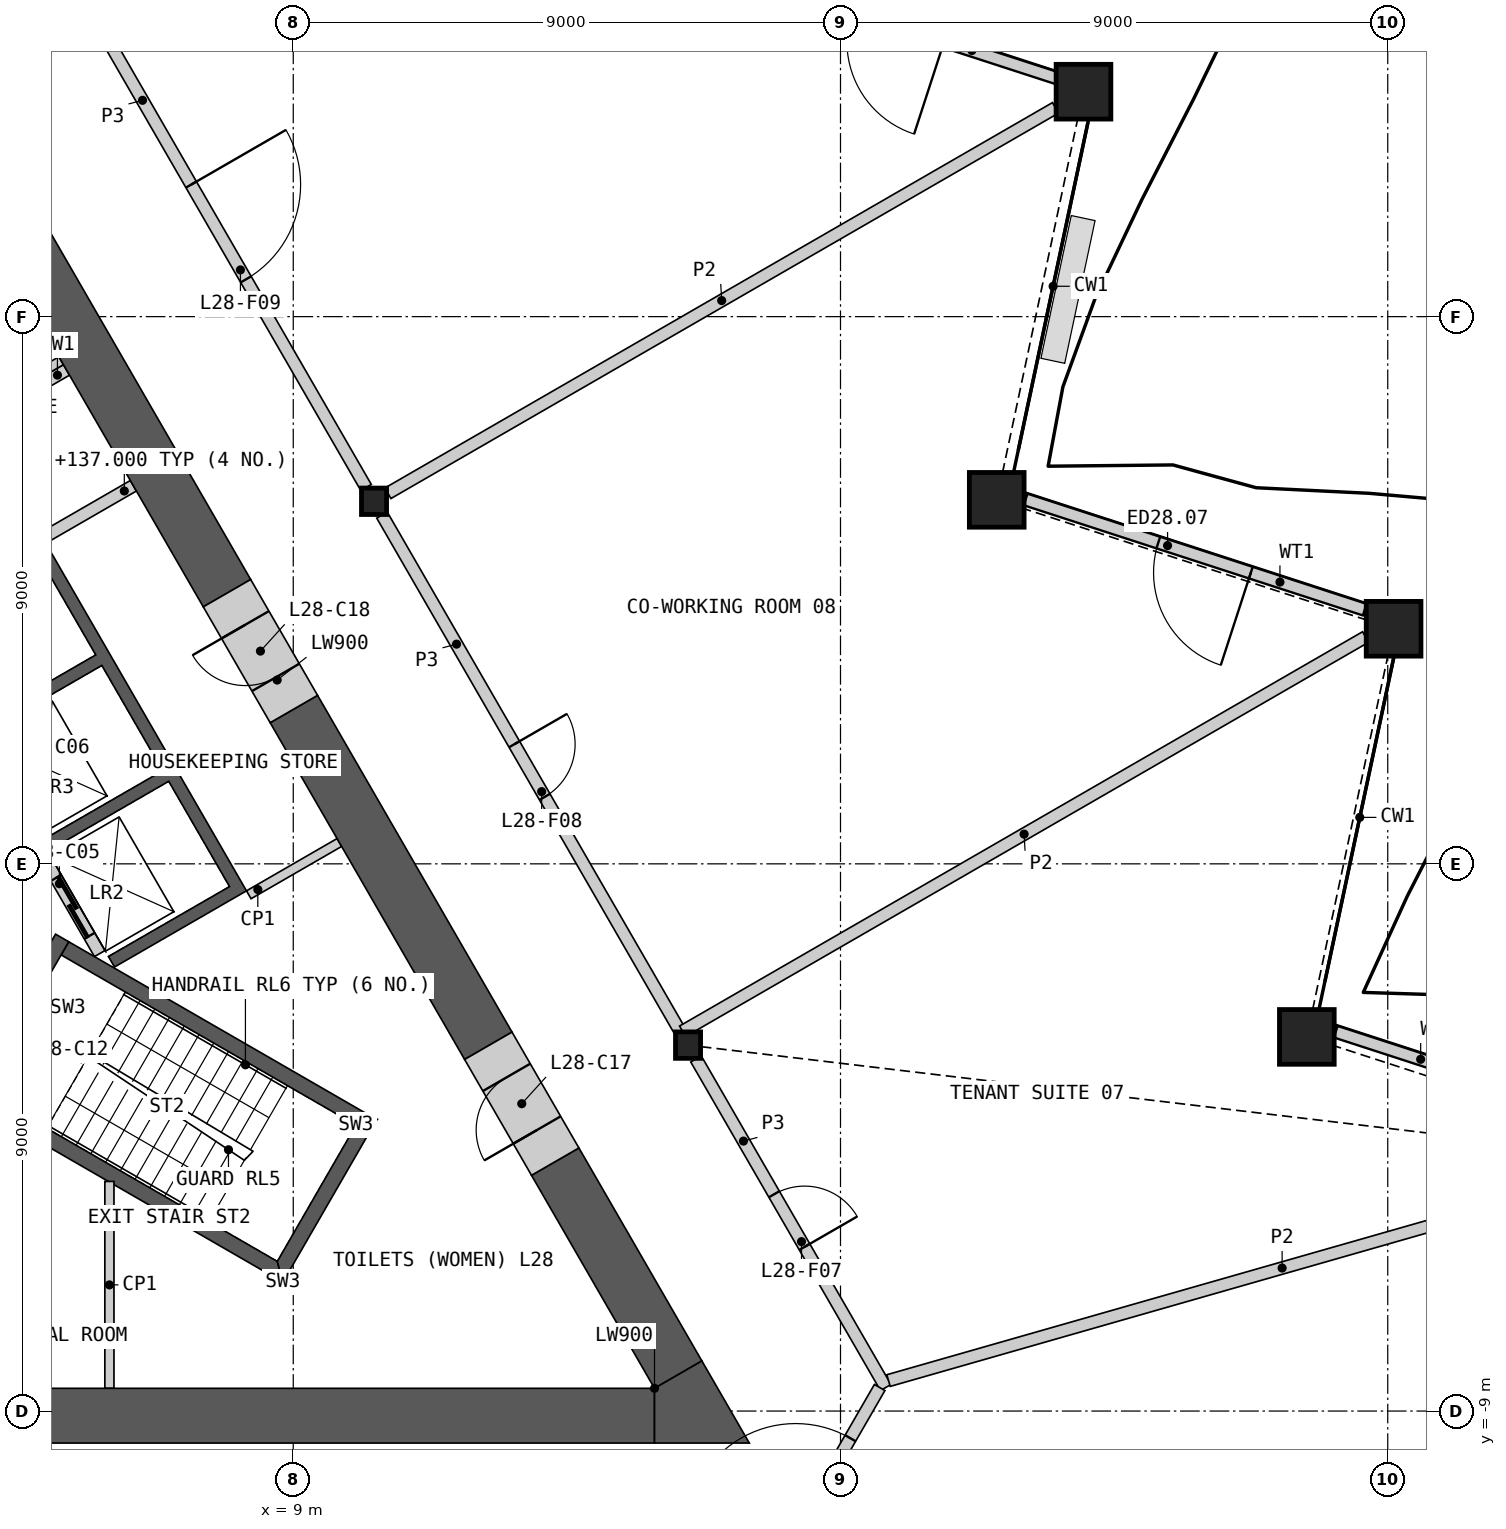
"""IFC4 building model, lengths in metres.
Left out: names, types, materials, properties, quantities, classifications, styles, units other than length and angle.
Written with IfcOpenShell. Run it as: python <this file> out.ifc"""

import sys

from ifc_helpers import new_model, si_unit, direction, frame, frame_2d, origin, origin_2d, place, context, subcontext, project, spatial, polyline, rectangle, hollow_rectangle, i_section, outline, extrude, element, fill, save


model = new_model("IFC4")
c1 = context("Model", 3, precision=1e-05, world=origin(), true_north=direction((0.0, 1.0)))
c2 = subcontext(c1, "Body", "Model", "MODEL_VIEW")
j1 = project(units=[si_unit("LENGTHUNIT", "METRE"), si_unit("PLANEANGLEUNIT", "RADIAN")], contexts=[c1])
p1 = place(None, origin())
s1 = spatial("IfcSite", under=j1, at=p1, CompositionType="ELEMENT")
p2 = place(p1, origin())
s2 = spatial("IfcBuilding", under=s1, at=p2, CompositionType="ELEMENT")
p3 = place(p2, frame((0.0, 0.0, 133.2)))
s3 = spatial("IfcBuildingStorey", under=s2, at=p3, CompositionType="ELEMENT", Elevation=133.2)
for number, where, z_axis, x_axis in (
    (1, (25.669, -2.846, 0.0), (0.0, 0.0, 1.0), (1.0, 0.0, 0.0)),
    (2, (27.096, 3.866, 0.0), (0.0, 0.0, 1.0), (1.0, 0.0, 0.0)),
    (3, (20.57, 5.987, 0.0), (0.0, 0.0, 1.0), (1.0, 0.0, 0.0)),
    (4, (21.996, 12.699, 0.0), (0.0, 0.0, 1.0), (1.0, 0.0, 0.0)),
):
    element("IfcColumn", number, at=place(p3, frame(where, z_axis=z_axis, x_axis=x_axis)), inside=s3, PredefinedType="COLUMN", context=c2, shape_type="SweptSolid", body=[
        extrude(hollow_rectangle(XDim=0.9, YDim=0.9, WallThickness=0.06, at=origin_2d()), origin(), (0.0, 0.0, 1.0), 4.2),
    ])
for number, where, z_axis, x_axis in (
    (5, (15.493, -2.982, 0.0), (0.0, 0.0, 1.0), (1.0, 0.0, 0.0)),
    (6, (10.328, 5.963, 0.0), (0.0, 0.0, 1.0), (1.0, 0.0, 0.0)),
):
    element("IfcColumn", number, at=place(p3, frame(where, z_axis=z_axis, x_axis=x_axis)), inside=s3, PredefinedType="COLUMN", context=c2, shape_type="SweptSolid", body=[
        extrude(i_section(OverallWidth=0.412, OverallDepth=0.435, WebThickness=0.036, FlangeThickness=0.057, at=origin_2d()), origin(), (0.0, 0.0, 1.0), 4.2),
    ])
p4 = place(p3, frame((31.734, -4.577, 0.0), z_axis=(0.0, 0.0, 1.0), x_axis=(-0.951060927669, 0.309003417231, 0.0)))
e7 = element("IfcWall", 7, at=p4, inside=s3, PredefinedType="SOLIDWALL", context=c2, shape_type="SweptSolid", body=[
    extrude(rectangle(XDim=5.877, YDim=0.2, at=frame_2d((2.939, 0.0))), origin(), (0.0, 0.0, 1.0), 3.189),
])
p5 = place(p4, frame((2.042, 0.0, 0.0)))
e8 = element("IfcOpeningElement", 8, at=p5, cuts=e7, PredefinedType="OPENING", context=c2, shape_type="SweptSolid", body=[
    extrude(rectangle(XDim=1.6, YDim=2.4, at=frame_2d((0.8, 1.2))), frame((0.0, 0.11, 0.0), z_axis=(0.0, -1.0, 0.0), x_axis=(1.0, 0.0, 0.0)), (0.0, 0.0, 1.0), 0.22),
])
p6 = place(p3, frame((26.622, 4.181, 0.0), z_axis=(0.0, 0.0, 1.0), x_axis=(-0.951053952554, 0.309024884649, 0.0)))
e9 = element("IfcWall", 9, at=p6, inside=s3, PredefinedType="SOLIDWALL", context=c2, shape_type="SweptSolid", body=[
    extrude(rectangle(XDim=5.865, YDim=0.2, at=frame_2d((2.932, 0.0))), origin(), (0.0, 0.0, 1.0), 3.189),
])
p7 = place(p6, frame((1.969, 0.0, 0.0)))
e10 = element("IfcOpeningElement", 10, at=p7, cuts=e9, PredefinedType="OPENING", context=c2, shape_type="SweptSolid", body=[
    extrude(rectangle(XDim=1.6, YDim=2.4, at=frame_2d((0.8, 1.2))), frame((0.0, 0.11, 0.0), z_axis=(0.0, -1.0, 0.0), x_axis=(1.0, 0.0, 0.0)), (0.0, 0.0, 1.0), 0.22),
])
p8 = place(p3, frame((21.567, 12.92, 0.0), z_axis=(0.0, 0.0, 1.0), x_axis=(-0.951051366173, 0.309032844373, 0.0)))
e11 = element("IfcWall", 11, at=p8, inside=s3, PredefinedType="SOLIDWALL", context=c2, shape_type="SweptSolid", body=[
    extrude(rectangle(XDim=5.912, YDim=0.2, at=frame_2d((2.956, 0.0))), origin(), (0.0, 0.0, 1.0), 3.189),
])
p9 = place(p8, frame((1.957, 0.0, 0.0)))
e12 = element("IfcOpeningElement", 12, at=p9, cuts=e11, PredefinedType="OPENING", context=c2, shape_type="SweptSolid", body=[
    extrude(rectangle(XDim=1.6, YDim=2.4, at=frame_2d((0.8, 1.2))), frame((0.0, 0.11, 0.0), z_axis=(0.0, -1.0, 0.0), x_axis=(1.0, 0.0, 0.0)), (0.0, 0.0, 1.0), 0.22),
])
p10 = place(p3, origin())
e13 = element("IfcWall", 13, at=p10, inside=s3, PredefinedType="SHEAR", context=c2, shape_type="SweptSolid", body=[
    extrude(outline(polyline([(2.66, 4.192), (4.831, 5.445), (8.231, -0.444), (6.061, -1.697), (5.96, -1.524), (7.952, -0.374), (6.952, 1.358), (4.96, 0.208), (4.861, 0.381), (6.852, 1.531), (5.852, 3.263), (3.861, 2.113), (3.76, 2.287), (5.752, 3.437), (4.752, 5.169), (2.76, 4.019), (2.66, 4.192)])), origin(), (0.0, 0.0, 1.0), 3.8),
])
p11 = place(p3, frame((5.817, -1.476, 0.0), z_axis=(0.0, 0.0, 1.0), x_axis=(-0.500002616675, 0.866023893041, 0.0)))
e14 = element("IfcWall", 14, at=p11, inside=s3, PredefinedType="SOLIDWALL", context=c2, shape_type="SweptSolid", body=[
    extrude(rectangle(XDim=8.373, YDim=0.2, at=frame_2d((4.187, 0.0))), origin(), (0.0, 0.0, 1.0), 3.8),
])
p12 = place(p11, frame((0.337, 0.0, 0.0)))
e15 = element("IfcOpeningElement", 15, at=p12, cuts=e14, PredefinedType="OPENING", context=c2, shape_type="SweptSolid", body=[
    extrude(rectangle(XDim=1.1, YDim=2.1, at=frame_2d((0.55, 1.05))), frame((0.0, 0.11, 0.0), z_axis=(0.0, -1.0, 0.0), x_axis=(1.0, 0.0, 0.0)), (0.0, 0.0, 1.0), 0.22),
])
p13 = place(p11, frame((2.537, 0.0, 0.0)))
e16 = element("IfcOpeningElement", 16, at=p13, cuts=e14, PredefinedType="OPENING", context=c2, shape_type="SweptSolid", body=[
    extrude(rectangle(XDim=1.1, YDim=2.1, at=frame_2d((0.55, 1.05))), frame((0.0, 0.11, 0.0), z_axis=(0.0, -1.0, 0.0), x_axis=(1.0, 0.0, 0.0)), (0.0, 0.0, 1.0), 0.22),
])
p14 = place(p11, frame((4.737, 0.0, 0.0)))
e17 = element("IfcOpeningElement", 17, at=p14, cuts=e14, PredefinedType="OPENING", context=c2, shape_type="SweptSolid", body=[
    extrude(rectangle(XDim=1.1, YDim=2.1, at=frame_2d((0.55, 1.05))), frame((0.0, 0.11, 0.0), z_axis=(0.0, -1.0, 0.0), x_axis=(1.0, 0.0, 0.0)), (0.0, 0.0, 1.0), 0.22),
])
p15 = place(p11, frame((7.037, 0.0, 0.0)))
e18 = element("IfcOpeningElement", 18, at=p15, cuts=e14, PredefinedType="OPENING", context=c2, shape_type="SweptSolid", body=[
    extrude(rectangle(XDim=0.9, YDim=2.1, at=frame_2d((0.45, 1.05))), frame((0.0, 0.11, 0.0), z_axis=(0.0, -1.0, 0.0), x_axis=(1.0, 0.0, 0.0)), (0.0, 0.0, 1.0), 0.22),
])
for number, where, z_axis, x_axis in (
    (19, (4.881, 5.358, 0.0), (0.0, 0.0, 1.0), (0.866, 0.5, 0.0)),
    (20, (3.781, 7.263, 0.0), (0.0, 0.0, 1.0), (0.866, 0.5, 0.0)),
):
    element("IfcWall", number, at=place(p3, frame(where, z_axis=z_axis, x_axis=x_axis)), inside=s3, PredefinedType="SHEAR", context=c2, shape_type="SweptSolid", body=[
        extrude(rectangle(XDim=1.72, YDim=0.2, at=frame_2d((0.86, 0.0))), origin(), (0.0, 0.0, 1.0), 3.8),
    ])
p16 = place(p3, origin())
e21 = element("IfcWall", 21, at=p16, inside=s3, PredefinedType="SHEAR", context=c2, shape_type="SweptSolid", body=[
    extrude(outline(polyline([(3.763, -3.956), (8.83, -6.881), (8.738, -6.539), (3.888, -3.739), (3.763, -3.956)])), origin(), (0.0, 0.0, 1.0), 3.8),
])
p17 = place(p3, origin())
e22 = element("IfcWall", 22, at=p17, inside=s3, PredefinedType="SHEAR", context=c2, shape_type="SweptSolid", body=[
    extrude(outline(polyline([(8.83, -6.881), (10.374, -4.206), (10.032, -4.298), (8.738, -6.539), (8.83, -6.881)])), origin(), (0.0, 0.0, 1.0), 3.8),
])
p18 = place(p3, origin())
e23 = element("IfcWall", 23, at=p18, inside=s3, PredefinedType="SHEAR", context=c2, shape_type="SweptSolid", body=[
    extrude(outline(polyline([(10.032, -4.298), (10.374, -4.206), (5.307, -1.281), (5.182, -1.498), (10.032, -4.298)])), origin(), (0.0, 0.0, 1.0), 3.8),
])
p19 = place(p3, frame((3.655, -3.893, 0.0), z_axis=(0.0, 0.0, 1.0), x_axis=(0.499982516597, 0.866035497597, 0.0)))
e24 = element("IfcWall", 24, at=p19, inside=s3, PredefinedType="SHEAR", context=c2, shape_type="SweptSolid", body=[
    extrude(rectangle(XDim=3.088, YDim=0.25, at=frame_2d((1.544, 0.0))), origin(), (0.0, 0.0, 1.0), 3.8),
])
p20 = place(p19, frame((0.994, 0.0, 0.0)))
e25 = element("IfcOpeningElement", 25, at=p20, cuts=e24, PredefinedType="OPENING", context=c2, shape_type="SweptSolid", body=[
    extrude(rectangle(XDim=1.1, YDim=2.1, at=frame_2d((0.55, 1.05))), frame((0.0, 0.135, 0.0), z_axis=(0.0, -1.0, 0.0), x_axis=(1.0, 0.0, 0.0)), (0.0, 0.0, 1.0), 0.27),
])
for number, where, z_axis, x_axis in (
    (26, (3.693, 7.415, 0.0), (0.0, 0.0, 1.0), (0.866, 0.5, 0.0)),
    (27, (8.268, -0.509, 0.0), (0.0, 0.0, 1.0), (0.866, 0.5, 0.0)),
):
    element("IfcWall", number, at=place(p3, frame(where, z_axis=z_axis, x_axis=x_axis)), inside=s3, PredefinedType="PARTITIONING", context=c2, shape_type="SweptSolid", body=[
        extrude(rectangle(XDim=1.72, YDim=0.15, at=frame_2d((0.86, 0.0))), origin(), (0.0, 0.0, 1.0), 3.8),
    ])
p21 = place(p3, frame((5.977, -8.626, 0.0), z_axis=(0.0, 0.0, 1.0), x_axis=(0.0, 1.0, 0.0)))
e28 = element("IfcWall", 28, at=p21, inside=s3, PredefinedType="PARTITIONING", context=c2, shape_type="SweptSolid", body=[
    extrude(rectangle(XDim=3.403, YDim=0.15, at=frame_2d((1.701, 0.0))), origin(), (0.0, 0.0, 1.0), 3.8),
])
p22 = place(p3, frame((3.913, -9.076, 0.0), z_axis=(0.0, 0.0, 1.0), x_axis=(1.0, 0.0, 0.0)))
e29 = element("IfcWall", 29, at=p22, inside=s3, PredefinedType="SHEAR", context=c2, shape_type="SweptSolid", body=[
    extrude(rectangle(XDim=11.029, YDim=0.9, at=frame_2d((5.514, 0.0))), origin(), (0.0, 0.0, 1.0), 3.8),
])
p23 = place(p3, frame((7.91, 4.451, 0.0), z_axis=(0.0, 0.0, 1.0), x_axis=(-0.500001962043, 0.866024270995, 0.0)))
e30 = element("IfcWall", 30, at=p23, inside=s3, PredefinedType="SHEAR", context=c2, shape_type="SweptSolid", body=[
    extrude(rectangle(XDim=8.796, YDim=0.9, at=frame_2d((4.398, 0.0))), origin(), (0.0, 0.0, 1.0), 3.8),
])
p24 = place(p3, frame((12.208, -2.992, 0.0), z_axis=(0.0, 0.0, 1.0), x_axis=(-0.499990106751, 0.866031115579, 0.0)))
e31 = element("IfcWall", 31, at=p24, inside=s3, PredefinedType="SHEAR", context=c2, shape_type="SweptSolid", body=[
    extrude(rectangle(XDim=6.396, YDim=0.9, at=frame_2d((3.198, 0.0))), origin(), (0.0, 0.0, 1.0), 3.8),
])
p25 = place(p3, frame((15.331, -8.401, 0.0), z_axis=(0.0, 0.0, 1.0), x_axis=(-0.499974938593, 0.866039872511, 0.0)))
e32 = element("IfcWall", 32, at=p25, inside=s3, PredefinedType="SHEAR", context=c2, shape_type="SweptSolid", body=[
    extrude(rectangle(XDim=4.046, YDim=0.9, at=frame_2d((2.023, 0.0))), origin(), (0.0, 0.0, 1.0), 3.8),
])
p26 = place(p3, origin())
e33 = element("IfcWall", 33, at=p26, inside=s3, PredefinedType="SHEAR", context=c2, shape_type="SweptSolid", body=[
    extrude(outline(polyline([(14.941, -8.626), (15.721, -8.176), (16.5, -9.526), (14.941, -9.526), (14.941, -8.626)])), origin(), (0.0, 0.0, 1.0), 3.8),
])
p27 = place(p3, frame((13.308, -4.898, 0.0), z_axis=(0.0, 0.0, 1.0), x_axis=(-0.50002983664, 0.866008176907, 0.0)))
e34 = element("IfcWall", 34, at=p27, inside=s3, PredefinedType="SHEAR", context=c2, shape_type="SweptSolid", body=[
    extrude(rectangle(XDim=2.2, YDim=0.9, at=frame_2d((1.1, 0.0))), origin(), (0.0, 0.0, 1.0), 3.8),
])
p28 = place(p27, frame((0.6, 0.0, 0.0)))
e35 = element("IfcOpeningElement", 35, at=p28, cuts=e34, PredefinedType="OPENING", context=c2, shape_type="SweptSolid", body=[
    extrude(rectangle(XDim=1.0, YDim=2.1, at=frame_2d((0.5, 1.05))), frame((0.0, 0.46, 0.0), z_axis=(0.0, -1.0, 0.0), x_axis=(1.0, 0.0, 0.0)), (0.0, 0.0, 1.0), 0.92),
])
p29 = place(p3, frame((9.01, 2.546, 0.0), z_axis=(0.0, 0.0, 1.0), x_axis=(-0.499994660107, 0.866028486751, 0.0)))
e36 = element("IfcWall", 36, at=p29, inside=s3, PredefinedType="SHEAR", context=c2, shape_type="SweptSolid", body=[
    extrude(rectangle(XDim=2.2, YDim=0.9, at=frame_2d((1.1, 0.0))), origin(), (0.0, 0.0, 1.0), 3.8),
])
p30 = place(p29, frame((0.6, 0.0, 0.0)))
e37 = element("IfcOpeningElement", 37, at=p30, cuts=e36, PredefinedType="OPENING", context=c2, shape_type="SweptSolid", body=[
    extrude(rectangle(XDim=1.0, YDim=2.1, at=frame_2d((0.5, 1.05))), frame((0.0, 0.46, 0.0), z_axis=(0.0, -1.0, 0.0), x_axis=(1.0, 0.0, 0.0)), (0.0, 0.0, 1.0), 0.92),
])
p31 = place(p3, frame((10.46, 5.736, 0.0), z_axis=(0.0, 0.0, 1.0), x_axis=(0.500004141693, -0.866023012564, 0.0)))
e38 = element("IfcWall", 38, at=p31, inside=s3, PredefinedType="PARTITIONING", context=c2, shape_type="SweptSolid", body=[
    extrude(rectangle(XDim=9.803, YDim=0.2, at=frame_2d((4.902, 0.0))), origin(), (0.0, 0.0, 1.0), 3.8),
])
p32 = place(p31, frame((4.352, 0.0, 0.0)))
e39 = element("IfcOpeningElement", 39, at=p32, cuts=e38, PredefinedType="OPENING", context=c2, shape_type="SweptSolid", body=[
    extrude(rectangle(XDim=1.0, YDim=2.1, at=frame_2d((0.5, 1.05))), frame((0.0, 0.11, 0.0), z_axis=(0.0, -1.0, 0.0), x_axis=(1.0, 0.0, 0.0)), (0.0, 0.0, 1.0), 0.22),
])
p33 = place(p3, frame((5.295, 14.68, 0.0), z_axis=(0.0, 0.0, 1.0), x_axis=(0.500012035596, -0.866018454918, 0.0)))
e40 = element("IfcWall", 40, at=p33, inside=s3, PredefinedType="PARTITIONING", context=c2, shape_type="SweptSolid", body=[
    extrude(rectangle(XDim=9.803, YDim=0.2, at=frame_2d((4.902, 0.0))), origin(), (0.0, 0.0, 1.0), 3.8),
])
p34 = place(p33, frame((4.052, 0.0, 0.0)))
e41 = element("IfcOpeningElement", 41, at=p34, cuts=e40, PredefinedType="OPENING", context=c2, shape_type="SweptSolid", body=[
    extrude(rectangle(XDim=1.8, YDim=2.1, at=frame_2d((0.9, 1.05))), frame((0.0, 0.11, 0.0), z_axis=(0.0, -1.0, 0.0), x_axis=(1.0, 0.0, 0.0)), (0.0, 0.0, 1.0), 0.22),
])
p35 = place(p3, frame((15.624, -3.209, 0.0), z_axis=(0.0, 0.0, 1.0), x_axis=(0.499997920671, -0.866026604282, 0.0)))
e42 = element("IfcWall", 42, at=p35, inside=s3, PredefinedType="PARTITIONING", context=c2, shape_type="SweptSolid", body=[
    extrude(rectangle(XDim=6.24, YDim=0.2, at=frame_2d((3.12, 0.0))), origin(), (0.0, 0.0, 1.0), 3.8),
])
p36 = place(p35, frame((2.57, 0.0, 0.0)))
e43 = element("IfcOpeningElement", 43, at=p36, cuts=e42, PredefinedType="OPENING", context=c2, shape_type="SweptSolid", body=[
    extrude(rectangle(XDim=1.0, YDim=2.1, at=frame_2d((0.5, 1.05))), frame((0.0, 0.11, 0.0), z_axis=(0.0, -1.0, 0.0), x_axis=(1.0, 0.0, 0.0)), (0.0, 0.0, 1.0), 0.22),
])
p37 = place(p3, frame((16.781, -11.84, 0.0), z_axis=(0.0, 0.0, 1.0), x_axis=(0.499958791762, 0.866049194065, 0.0)))
e44 = element("IfcWall", 44, at=p37, inside=s3, PredefinedType="PARTITIONING", context=c2, shape_type="SweptSolid", body=[
    extrude(rectangle(XDim=3.726, YDim=0.2, at=frame_2d((1.863, 0.0))), origin(), (0.0, 0.0, 1.0), 3.8),
])
p38 = place(p37, frame((0.963, 0.0, 0.0)))
e45 = element("IfcOpeningElement", 45, at=p38, cuts=e44, PredefinedType="OPENING", context=c2, shape_type="SweptSolid", body=[
    extrude(rectangle(XDim=1.8, YDim=2.1, at=frame_2d((0.9, 1.05))), frame((0.0, 0.11, 0.0), z_axis=(0.0, -1.0, 0.0), x_axis=(1.0, 0.0, 0.0)), (0.0, 0.0, 1.0), 0.22),
])
p39 = place(p3, frame((18.79, -8.499, 0.0), z_axis=(0.0, 0.0, 1.0), x_axis=(0.961478776026, 0.274879179372, 0.0)))
e46 = element("IfcWall", 46, at=p39, inside=s3, PredefinedType="PARTITIONING", context=c2, shape_type="SweptSolid", body=[
    extrude(rectangle(XDim=13.465, YDim=0.2, at=frame_2d((6.732, 0.0))), origin(), (0.0, 0.0, 1.0), 2.885),
])
p40 = place(p3, frame((15.403, -2.754, 0.0), z_axis=(0.0, 0.0, 1.0), x_axis=(0.866024473704, 0.500001610943, 0.0)))
e47 = element("IfcWall", 47, at=p40, inside=s3, PredefinedType="PARTITIONING", context=c2, shape_type="SweptSolid", body=[
    extrude(rectangle(XDim=12.971, YDim=0.2, at=frame_2d((6.485, 0.0))), origin(), (0.0, 0.0, 1.0), 2.885),
])
p41 = place(p3, frame((10.556, 6.094, 0.0), z_axis=(0.0, 0.0, 1.0), x_axis=(0.86602461759, 0.500001361726, 0.0)))
e48 = element("IfcWall", 48, at=p41, inside=s3, PredefinedType="PARTITIONING", context=c2, shape_type="SweptSolid", body=[
    extrude(rectangle(XDim=12.679, YDim=0.2, at=frame_2d((6.34, 0.0))), origin(), (0.0, 0.0, 1.0), 2.885),
])
p42 = place(p7, origin())
e49 = element("IfcDoor", 49, at=p42, inside=s3, OperationType="DOUBLE_DOOR_SINGLE_SWING", PredefinedType="DOOR", context=c2, shape_type="SweptSolid", body=[
    extrude(rectangle(XDim=1.6, YDim=2.4, at=frame_2d((0.8, 1.2))), frame((0.0, 0.025, 0.0), z_axis=(0.0, -1.0, 0.0), x_axis=(1.0, 0.0, 0.0)), (0.0, 0.0, 1.0), 0.05),
])
fill(e10, e49)
p43 = place(p12, origin())
e50 = element("IfcDoor", 50, at=p43, inside=s3, OperationType="SLIDING_TO_LEFT", PredefinedType="DOOR", context=c2, shape_type="SweptSolid", body=[
    extrude(rectangle(XDim=1.1, YDim=2.1, at=frame_2d((0.55, 1.05))), frame((0.0, 0.025, 0.0), z_axis=(0.0, -1.0, 0.0), x_axis=(1.0, 0.0, 0.0)), (0.0, 0.0, 1.0), 0.05),
])
fill(e15, e50)
p44 = place(p28, origin())
e51 = element("IfcDoor", 51, at=p44, inside=s3, OperationType="SINGLE_SWING_LEFT", PredefinedType="DOOR", context=c2, shape_type="SweptSolid", body=[
    extrude(rectangle(XDim=1.0, YDim=2.1, at=frame_2d((0.5, 1.05))), frame((0.0, 0.205, 0.0), z_axis=(0.0, -1.0, 0.0), x_axis=(1.0, 0.0, 0.0)), (0.0, 0.0, 1.0), 0.05),
])
fill(e35, e51)
p45 = place(p30, origin())
e52 = element("IfcDoor", 52, at=p45, inside=s3, OperationType="SINGLE_SWING_RIGHT", PredefinedType="DOOR", context=c2, shape_type="SweptSolid", body=[
    extrude(rectangle(XDim=1.0, YDim=2.1, at=frame_2d((0.5, 1.05))), frame((0.0, 0.205, 0.0), z_axis=(0.0, -1.0, 0.0), x_axis=(1.0, 0.0, 0.0)), (0.0, 0.0, 1.0), 0.05),
])
fill(e37, e52)
p46 = place(p38, origin())
e53 = element("IfcDoor", 53, at=p46, inside=s3, OperationType="DOUBLE_DOOR_SINGLE_SWING", PredefinedType="DOOR", context=c2, shape_type="SweptSolid", body=[
    extrude(rectangle(XDim=1.8, YDim=2.1, at=frame_2d((0.9, 1.05))), frame((0.0, 0.025, 0.0), z_axis=(0.0, -1.0, 0.0), x_axis=(1.0, 0.0, 0.0)), (0.0, 0.0, 1.0), 0.05),
])
fill(e45, e53)
p47 = place(p36, origin())
e54 = element("IfcDoor", 54, at=p47, inside=s3, OperationType="SINGLE_SWING_RIGHT", PredefinedType="DOOR", context=c2, shape_type="SweptSolid", body=[
    extrude(rectangle(XDim=1.0, YDim=2.1, at=frame_2d((0.5, 1.05))), frame((0.0, 0.025, 0.0), z_axis=(0.0, -1.0, 0.0), x_axis=(1.0, 0.0, 0.0)), (0.0, 0.0, 1.0), 0.05),
])
fill(e43, e54)
p48 = place(p32, origin())
e55 = element("IfcDoor", 55, at=p48, inside=s3, OperationType="SINGLE_SWING_LEFT", PredefinedType="DOOR", context=c2, shape_type="SweptSolid", body=[
    extrude(rectangle(XDim=1.0, YDim=2.1, at=frame_2d((0.5, 1.05))), frame((0.0, 0.025, 0.0), z_axis=(0.0, -1.0, 0.0), x_axis=(1.0, 0.0, 0.0)), (0.0, 0.0, 1.0), 0.05),
])
fill(e39, e55)
p49 = place(p34, origin())
e56 = element("IfcDoor", 56, at=p49, inside=s3, OperationType="DOUBLE_DOOR_SINGLE_SWING", PredefinedType="DOOR", context=c2, shape_type="SweptSolid", body=[
    extrude(rectangle(XDim=1.8, YDim=2.1, at=frame_2d((0.9, 1.05))), frame((0.0, 0.025, 0.0), z_axis=(0.0, -1.0, 0.0), x_axis=(1.0, 0.0, 0.0)), (0.0, 0.0, 1.0), 0.05),
])
fill(e41, e56)
save(model, sys.argv[1])
